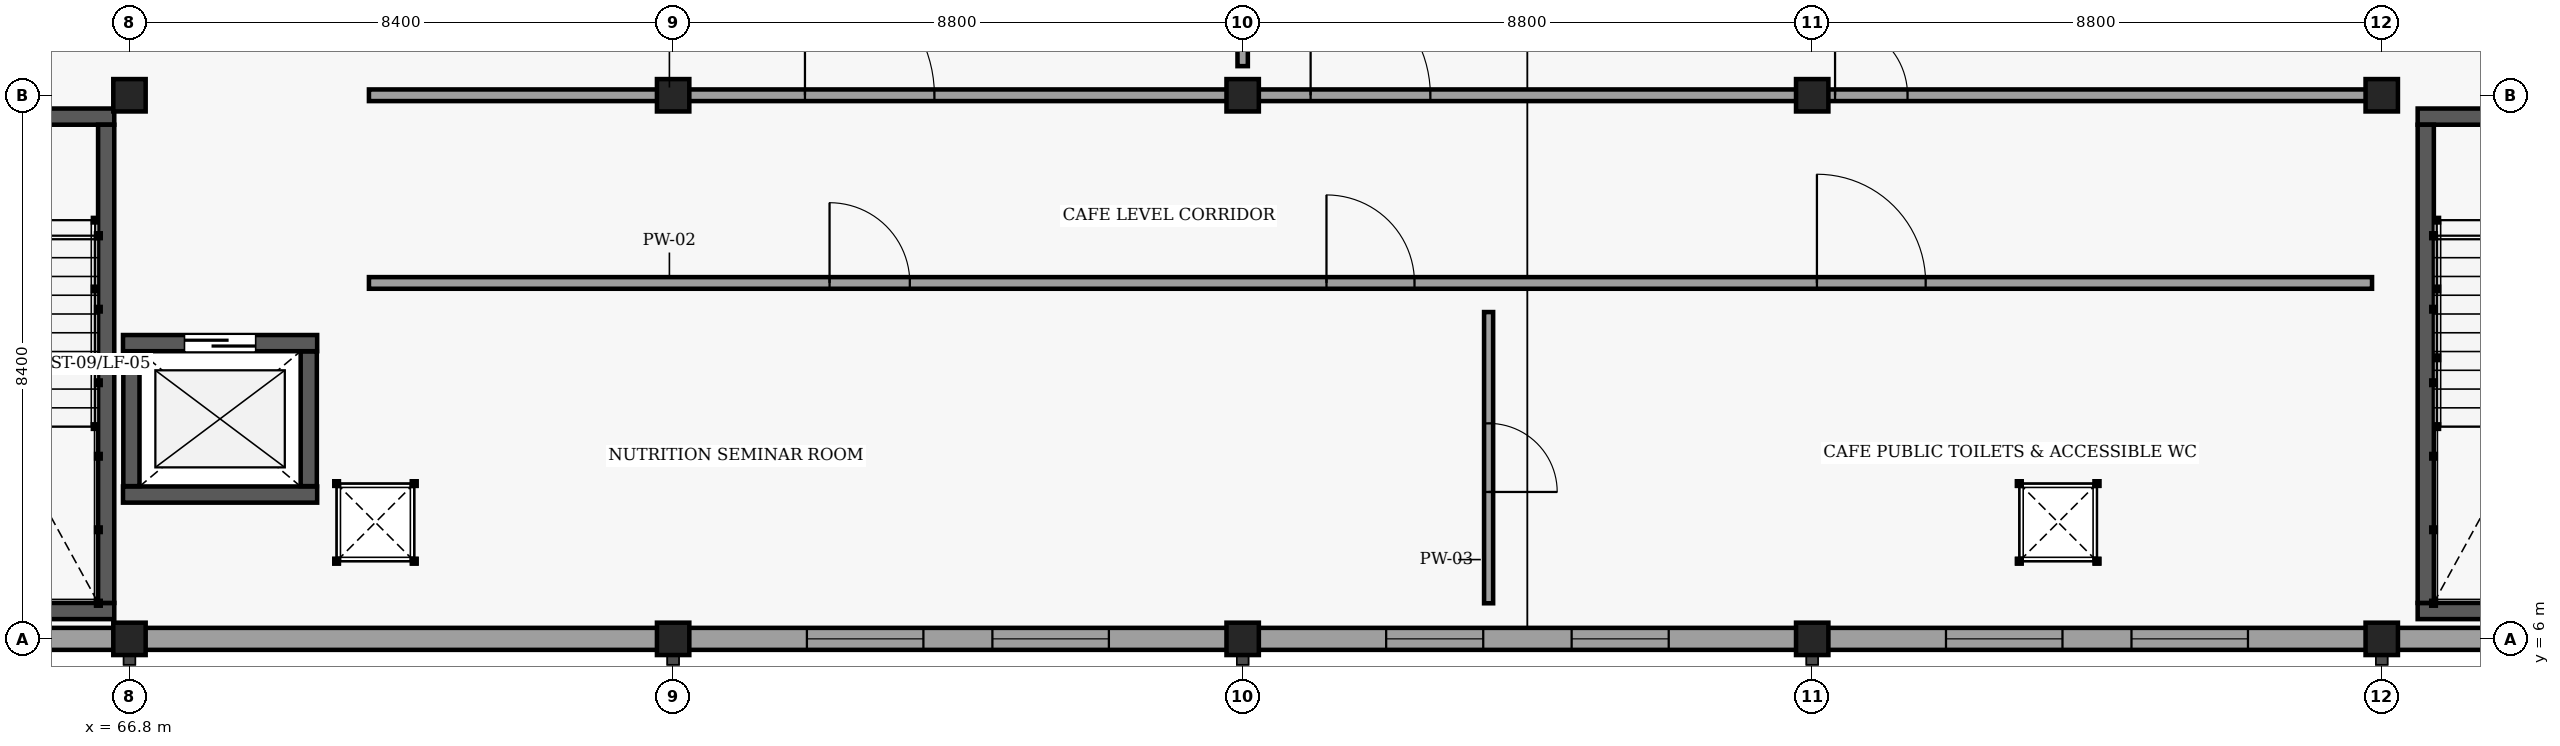
"""IFC4 building model, lengths in metres.
Left out: names, types, materials, properties, quantities, classifications, styles, units other than length and angle.
Written with IfcOpenShell. Run it as: python <this file> out.ifc"""

import sys

from ifc_helpers import new_model, si_unit, direction, frame, frame_2d, origin, origin_2d, place, context, subcontext, project, spatial, rectangle, extrude, element, fill, save


model = new_model("IFC4")
c1 = context("Model", 3, precision=1e-05, world=origin(), true_north=direction((0.0, 1.0)))
c2 = subcontext(c1, "Body", "Model", "MODEL_VIEW")
j1 = project(units=[si_unit("LENGTHUNIT", "METRE"), si_unit("PLANEANGLEUNIT", "RADIAN")], contexts=[c1])
p1 = place(None, origin())
s1 = spatial("IfcSite", under=j1, at=p1, CompositionType="ELEMENT")
p2 = place(p1, origin())
s2 = spatial("IfcBuilding", under=s1, at=p2, CompositionType="ELEMENT")
p3 = place(p2, frame((0.0, 0.0, 4.8)))
s3 = spatial("IfcBuildingStorey", under=s2, at=p3, CompositionType="ELEMENT", Elevation=4.8)
for number, where, z_axis, x_axis in (
    (1, (66.8, 6.0, 0.0), (0.0, 0.0, 1.0), (1.0, 0.0, 0.0)),
    (2, (66.8, 14.4, 0.0), (0.0, 0.0, 1.0), (1.0, 0.0, 0.0)),
    (3, (75.2, 6.0, 0.0), (0.0, 0.0, 1.0), (1.0, 0.0, 0.0)),
    (4, (75.2, 14.4, 0.0), (0.0, 0.0, 1.0), (1.0, 0.0, 0.0)),
    (5, (84.0, 6.0, 0.0), (0.0, 0.0, 1.0), (1.0, 0.0, 0.0)),
    (6, (84.0, 14.4, 0.0), (0.0, 0.0, 1.0), (1.0, 0.0, 0.0)),
    (7, (92.8, 6.0, 0.0), (0.0, 0.0, 1.0), (1.0, 0.0, 0.0)),
    (8, (92.8, 14.4, 0.0), (0.0, 0.0, 1.0), (1.0, 0.0, 0.0)),
    (9, (101.6, 6.0, 0.0), (0.0, 0.0, 1.0), (1.0, 0.0, 0.0)),
    (10, (101.6, 14.4, 0.0), (0.0, 0.0, 1.0), (1.0, 0.0, 0.0)),
):
    element("IfcColumn", number, at=place(p3, frame(where, z_axis=z_axis, x_axis=x_axis)), inside=s3, PredefinedType="COLUMN", context=c2, shape_type="SweptSolid", body=[
        extrude(rectangle(XDim=0.5, YDim=0.5, at=origin_2d()), origin(), (0.0, 0.0, 1.0), 4.2),
    ])
p4 = place(p3, frame((58.5, 6.0, 0.0), z_axis=(0.0, 0.0, 1.0), x_axis=(1.0, 0.0, 0.0)))
e11 = element("IfcWall", 11, at=p4, inside=s3, PredefinedType="SOLIDWALL", context=c2, shape_type="SweptSolid", body=[
    extrude(rectangle(XDim=8.2, YDim=0.34, at=frame_2d((4.1, 0.0))), origin(), (0.0, 0.0, 1.0), 3.465),
])
p5 = place(p3, frame((66.9, 6.0, 0.0), z_axis=(0.0, 0.0, 1.0), x_axis=(1.0, 0.0, 0.0)))
e12 = element("IfcWall", 12, at=p5, inside=s3, PredefinedType="SOLIDWALL", context=c2, shape_type="SweptSolid", body=[
    extrude(rectangle(XDim=8.2, YDim=0.34, at=frame_2d((4.1, 0.0))), origin(), (0.0, 0.0, 1.0), 3.465),
])
p6 = place(p3, frame((75.3, 6.0, 0.0), z_axis=(0.0, 0.0, 1.0), x_axis=(1.0, 0.0, 0.0)))
e13 = element("IfcWall", 13, at=p6, inside=s3, PredefinedType="SOLIDWALL", context=c2, shape_type="SweptSolid", body=[
    extrude(rectangle(XDim=8.6, YDim=0.34, at=frame_2d((4.3, 0.0))), origin(), (0.0, 0.0, 1.0), 3.465),
])
p7 = place(p6, frame((1.967, 0.0, 1.1)))
e14 = element("IfcOpeningElement", 14, at=p7, cuts=e13, PredefinedType="OPENING", context=c2, shape_type="SweptSolid", body=[
    extrude(rectangle(XDim=1.8, YDim=1.5, at=frame_2d((0.9, 0.75))), frame((0.0, 0.18, 0.0), z_axis=(0.0, -1.0, 0.0), x_axis=(1.0, 0.0, 0.0)), (0.0, 0.0, 1.0), 0.36),
])
p8 = place(p6, frame((4.833, 0.0, 1.1)))
e15 = element("IfcOpeningElement", 15, at=p8, cuts=e13, PredefinedType="OPENING", context=c2, shape_type="SweptSolid", body=[
    extrude(rectangle(XDim=1.8, YDim=1.5, at=frame_2d((0.9, 0.75))), frame((0.0, 0.18, 0.0), z_axis=(0.0, -1.0, 0.0), x_axis=(1.0, 0.0, 0.0)), (0.0, 0.0, 1.0), 0.36),
])
p9 = place(p3, frame((84.1, 6.0, 0.0), z_axis=(0.0, 0.0, 1.0), x_axis=(1.0, 0.0, 0.0)))
e16 = element("IfcWall", 16, at=p9, inside=s3, PredefinedType="SOLIDWALL", context=c2, shape_type="SweptSolid", body=[
    extrude(rectangle(XDim=8.6, YDim=0.34, at=frame_2d((4.3, 0.0))), origin(), (0.0, 0.0, 1.0), 3.465),
])
p10 = place(p9, frame((2.117, 0.0, 1.1)))
e17 = element("IfcOpeningElement", 17, at=p10, cuts=e16, PredefinedType="OPENING", context=c2, shape_type="SweptSolid", body=[
    extrude(rectangle(XDim=1.5, YDim=1.8, at=frame_2d((0.75, 0.9))), frame((0.0, 0.18, 0.0), z_axis=(0.0, -1.0, 0.0), x_axis=(1.0, 0.0, 0.0)), (0.0, 0.0, 1.0), 0.36),
])
p11 = place(p9, frame((4.983, 0.0, 1.1)))
e18 = element("IfcOpeningElement", 18, at=p11, cuts=e16, PredefinedType="OPENING", context=c2, shape_type="SweptSolid", body=[
    extrude(rectangle(XDim=1.5, YDim=1.8, at=frame_2d((0.75, 0.9))), frame((0.0, 0.18, 0.0), z_axis=(0.0, -1.0, 0.0), x_axis=(1.0, 0.0, 0.0)), (0.0, 0.0, 1.0), 0.36),
])
p12 = place(p3, frame((92.9, 6.0, 0.0), z_axis=(0.0, 0.0, 1.0), x_axis=(1.0, 0.0, 0.0)))
e19 = element("IfcWall", 19, at=p12, inside=s3, PredefinedType="SOLIDWALL", context=c2, shape_type="SweptSolid", body=[
    extrude(rectangle(XDim=8.6, YDim=0.34, at=frame_2d((4.3, 0.0))), origin(), (0.0, 0.0, 1.0), 3.465),
])
p13 = place(p12, frame((1.967, 0.0, 1.1)))
e20 = element("IfcOpeningElement", 20, at=p13, cuts=e19, PredefinedType="OPENING", context=c2, shape_type="SweptSolid", body=[
    extrude(rectangle(XDim=1.8, YDim=1.8, at=frame_2d((0.9, 0.9))), frame((0.0, 0.18, 0.0), z_axis=(0.0, -1.0, 0.0), x_axis=(1.0, 0.0, 0.0)), (0.0, 0.0, 1.0), 0.36),
])
p14 = place(p12, frame((4.833, 0.0, 1.1)))
e21 = element("IfcOpeningElement", 21, at=p14, cuts=e19, PredefinedType="OPENING", context=c2, shape_type="SweptSolid", body=[
    extrude(rectangle(XDim=1.8, YDim=1.8, at=frame_2d((0.9, 0.9))), frame((0.0, 0.18, 0.0), z_axis=(0.0, -1.0, 0.0), x_axis=(1.0, 0.0, 0.0)), (0.0, 0.0, 1.0), 0.36),
])
p15 = place(p3, frame((101.7, 6.0, 0.0), z_axis=(0.0, 0.0, 1.0), x_axis=(1.0, 0.0, 0.0)))
e22 = element("IfcWall", 22, at=p15, inside=s3, PredefinedType="SOLIDWALL", context=c2, shape_type="SweptSolid", body=[
    extrude(rectangle(XDim=8.6, YDim=0.34, at=frame_2d((4.3, 0.0))), origin(), (0.0, 0.0, 1.0), 3.465),
])
p16 = place(p3, frame((62.955, 14.07, 0.0), z_axis=(0.0, 0.0, 1.0), x_axis=(1.0, 0.0, 0.0)))
e23 = element("IfcWall", 23, at=p16, inside=s3, PredefinedType="SHEAR", context=c2, shape_type="SweptSolid", body=[
    extrude(rectangle(XDim=3.61, YDim=0.25, at=frame_2d((1.805, 0.0))), origin(), (0.0, 0.0, 1.0), 3.96),
])
p17 = place(p16, frame((1.205, 0.0, 0.0)))
e24 = element("IfcOpeningElement", 24, at=p17, cuts=e23, PredefinedType="OPENING", context=c2, shape_type="SweptSolid", body=[
    extrude(rectangle(XDim=1.2, YDim=2.15, at=frame_2d((0.6, 1.075))), frame((0.0, 0.135, 0.0), z_axis=(0.0, -1.0, 0.0), x_axis=(1.0, 0.0, 0.0)), (0.0, 0.0, 1.0), 0.27),
])
p18 = place(p3, frame((66.565, 6.43, 0.0), z_axis=(0.0, 0.0, 1.0), x_axis=(-1.0, 0.0, 0.0)))
e25 = element("IfcWall", 25, at=p18, inside=s3, PredefinedType="SHEAR", context=c2, shape_type="SweptSolid", body=[
    extrude(rectangle(XDim=3.61, YDim=0.25, at=frame_2d((1.805, 0.0))), origin(), (0.0, 0.0, 1.0), 3.96),
])
p19 = place(p3, frame((66.44, 13.945, 0.0), z_axis=(0.0, 0.0, 1.0), x_axis=(0.0, -1.0, 0.0)))
e26 = element("IfcWall", 26, at=p19, inside=s3, PredefinedType="SHEAR", context=c2, shape_type="SweptSolid", body=[
    extrude(rectangle(XDim=7.39, YDim=0.25, at=frame_2d((3.695, 0.0))), origin(), (0.0, 0.0, 1.0), 3.96),
])
p20 = place(p3, frame((66.7, 8.23, 0.0), z_axis=(0.0, 0.0, 1.0), x_axis=(1.0, 0.0, 0.0)))
e27 = element("IfcWall", 27, at=p20, inside=s3, PredefinedType="SHEAR", context=c2, shape_type="SweptSolid", body=[
    extrude(rectangle(XDim=3.0, YDim=0.25, at=frame_2d((1.5, 0.0))), origin(), (0.0, 0.0, 1.0), 3.96),
])
p21 = place(p3, frame((69.7, 10.57, 0.0), z_axis=(0.0, 0.0, 1.0), x_axis=(-1.0, 0.0, 0.0)))
e28 = element("IfcWall", 28, at=p21, inside=s3, PredefinedType="SHEAR", context=c2, shape_type="SweptSolid", body=[
    extrude(rectangle(XDim=3.0, YDim=0.25, at=frame_2d((1.5, 0.0))), origin(), (0.0, 0.0, 1.0), 3.96),
])
p22 = place(p21, frame((0.95, 0.0, 0.0)))
e29 = element("IfcOpeningElement", 29, at=p22, cuts=e28, PredefinedType="OPENING", context=c2, shape_type="SweptSolid", body=[
    extrude(rectangle(XDim=1.1, YDim=2.15, at=frame_2d((0.55, 1.075))), frame((0.0, 0.135, 0.0), z_axis=(0.0, -1.0, 0.0), x_axis=(1.0, 0.0, 0.0)), (0.0, 0.0, 1.0), 0.27),
])
for number, where, z_axis, x_axis in (
    (30, (69.57, 8.36, 0.0), (0.0, 0.0, 1.0), (0.0, 1.0, 0.0)),
    (31, (66.83, 10.44, 0.0), (0.0, 0.0, 1.0), (0.0, -1.0, 0.0)),
):
    element("IfcWall", number, at=place(p3, frame(where, z_axis=z_axis, x_axis=x_axis)), inside=s3, PredefinedType="SHEAR", context=c2, shape_type="SweptSolid", body=[
        extrude(rectangle(XDim=2.08, YDim=0.25, at=frame_2d((1.04, 0.0))), origin(), (0.0, 0.0, 1.0), 3.96),
    ])
p23 = place(p3, frame((102.155, 14.07, 0.0), z_axis=(0.0, 0.0, 1.0), x_axis=(1.0, 0.0, 0.0)))
e32 = element("IfcWall", 32, at=p23, inside=s3, PredefinedType="SHEAR", context=c2, shape_type="SweptSolid", body=[
    extrude(rectangle(XDim=3.61, YDim=0.25, at=frame_2d((1.805, 0.0))), origin(), (0.0, 0.0, 1.0), 3.96),
])
p24 = place(p23, frame((1.235, 0.0, 0.0)))
e33 = element("IfcOpeningElement", 33, at=p24, cuts=e32, PredefinedType="OPENING", context=c2, shape_type="SweptSolid", body=[
    extrude(rectangle(XDim=1.14, YDim=2.15, at=frame_2d((0.57, 1.075))), frame((0.0, 0.135, 0.0), z_axis=(0.0, -1.0, 0.0), x_axis=(1.0, 0.0, 0.0)), (0.0, 0.0, 1.0), 0.27),
])
p25 = place(p3, frame((105.765, 6.43, 0.0), z_axis=(0.0, 0.0, 1.0), x_axis=(-1.0, 0.0, 0.0)))
e34 = element("IfcWall", 34, at=p25, inside=s3, PredefinedType="SHEAR", context=c2, shape_type="SweptSolid", body=[
    extrude(rectangle(XDim=3.61, YDim=0.25, at=frame_2d((1.805, 0.0))), origin(), (0.0, 0.0, 1.0), 3.96),
])
p26 = place(p3, frame((102.28, 6.555, 0.0), z_axis=(0.0, 0.0, 1.0), x_axis=(0.0, 1.0, 0.0)))
e35 = element("IfcWall", 35, at=p26, inside=s3, PredefinedType="SHEAR", context=c2, shape_type="SweptSolid", body=[
    extrude(rectangle(XDim=7.39, YDim=0.25, at=frame_2d((3.695, 0.0))), origin(), (0.0, 0.0, 1.0), 3.96),
])
p27 = place(p3, frame((70.5, 11.5, 0.0), z_axis=(0.0, 0.0, 1.0), x_axis=(1.0, 0.0, 0.0)))
e36 = element("IfcWall", 36, at=p27, inside=s3, PredefinedType="PARTITIONING", context=c2, shape_type="SweptSolid", body=[
    extrude(rectangle(XDim=30.95, YDim=0.18, at=frame_2d((15.475, 0.0))), origin(), (0.0, 0.0, 1.0), 3.295),
])
p28 = place(p27, frame((7.117, 0.0, 0.0)))
e37 = element("IfcOpeningElement", 37, at=p28, cuts=e36, PredefinedType="OPENING", context=c2, shape_type="SweptSolid", body=[
    extrude(rectangle(XDim=1.24, YDim=2.2, at=frame_2d((0.62, 1.1))), frame((0.0, 0.1, 0.0), z_axis=(0.0, -1.0, 0.0), x_axis=(1.0, 0.0, 0.0)), (0.0, 0.0, 1.0), 0.2),
])
p29 = place(p27, frame((14.795, 0.0, 0.0)))
e38 = element("IfcOpeningElement", 38, at=p29, cuts=e36, PredefinedType="OPENING", context=c2, shape_type="SweptSolid", body=[
    extrude(rectangle(XDim=1.36, YDim=2.22, at=frame_2d((0.68, 1.11))), frame((0.0, 0.1, 0.0), z_axis=(0.0, -1.0, 0.0), x_axis=(1.0, 0.0, 0.0)), (0.0, 0.0, 1.0), 0.2),
])
p30 = place(p27, frame((22.373, 0.0, 0.0)))
e39 = element("IfcOpeningElement", 39, at=p30, cuts=e36, PredefinedType="OPENING", context=c2, shape_type="SweptSolid", body=[
    extrude(rectangle(XDim=1.68, YDim=2.26, at=frame_2d((0.84, 1.13))), frame((0.0, 0.1, 0.0), z_axis=(0.0, -1.0, 0.0), x_axis=(1.0, 0.0, 0.0)), (0.0, 0.0, 1.0), 0.2),
])
p31 = place(p3, frame((70.5, 14.4, 0.0), z_axis=(0.0, 0.0, 1.0), x_axis=(1.0, 0.0, 0.0)))
e40 = element("IfcWall", 40, at=p31, inside=s3, PredefinedType="PARTITIONING", context=c2, shape_type="SweptSolid", body=[
    extrude(rectangle(XDim=30.95, YDim=0.18, at=frame_2d((15.475, 0.0))), origin(), (0.0, 0.0, 1.0), 3.245),
])
p32 = place(p31, frame((6.737, 0.0, 0.0)))
e41 = element("IfcOpeningElement", 41, at=p32, cuts=e40, PredefinedType="OPENING", context=c2, shape_type="SweptSolid", body=[
    extrude(rectangle(XDim=2.0, YDim=2.3, at=frame_2d((1.0, 1.15))), frame((0.0, 0.1, 0.0), z_axis=(0.0, -1.0, 0.0), x_axis=(1.0, 0.0, 0.0)), (0.0, 0.0, 1.0), 0.2),
])
p33 = place(p31, frame((14.55, 0.0, 0.0)))
e42 = element("IfcOpeningElement", 42, at=p33, cuts=e40, PredefinedType="OPENING", context=c2, shape_type="SweptSolid", body=[
    extrude(rectangle(XDim=1.85, YDim=2.22, at=frame_2d((0.925, 1.11))), frame((0.0, 0.1, 0.0), z_axis=(0.0, -1.0, 0.0), x_axis=(1.0, 0.0, 0.0)), (0.0, 0.0, 1.0), 0.2),
])
p34 = place(p31, frame((22.653, 0.0, 0.0)))
e43 = element("IfcOpeningElement", 43, at=p34, cuts=e40, PredefinedType="OPENING", context=c2, shape_type="SweptSolid", body=[
    extrude(rectangle(XDim=1.12, YDim=2.16, at=frame_2d((0.56, 1.08))), frame((0.0, 0.1, 0.0), z_axis=(0.0, -1.0, 0.0), x_axis=(1.0, 0.0, 0.0)), (0.0, 0.0, 1.0), 0.2),
])
p35 = place(p3, frame((87.8, 6.55, 0.0), z_axis=(0.0, 0.0, 1.0), x_axis=(0.0, 1.0, 0.0)))
e44 = element("IfcWall", 44, at=p35, inside=s3, PredefinedType="PARTITIONING", context=c2, shape_type="SweptSolid", body=[
    extrude(rectangle(XDim=4.5, YDim=0.14, at=frame_2d((2.25, 0.0))), origin(), (0.0, 0.0, 1.0), 3.945),
])
p36 = place(p35, frame((1.72, 0.0, 0.0)))
e45 = element("IfcOpeningElement", 45, at=p36, cuts=e44, PredefinedType="OPENING", context=c2, shape_type="SweptSolid", body=[
    extrude(rectangle(XDim=1.06, YDim=2.16, at=frame_2d((0.53, 1.08))), frame((0.0, 0.08, 0.0), z_axis=(0.0, -1.0, 0.0), x_axis=(1.0, 0.0, 0.0)), (0.0, 0.0, 1.0), 0.16),
])
p37 = place(p3, frame((84.0, 14.85, 0.0), z_axis=(0.0, 0.0, 1.0), x_axis=(0.0, 1.0, 0.0)))
e46 = element("IfcWall", 46, at=p37, inside=s3, PredefinedType="PARTITIONING", context=c2, shape_type="SweptSolid", body=[
    extrude(rectangle(XDim=7.2, YDim=0.16, at=frame_2d((3.6, 0.0))), origin(), (0.0, 0.0, 1.0), 3.295),
])
p38 = place(p37, frame((3.1, 0.0, 0.0)))
e47 = element("IfcOpeningElement", 47, at=p38, cuts=e46, PredefinedType="OPENING", context=c2, shape_type="SweptSolid", body=[
    extrude(rectangle(XDim=1.0, YDim=2.14, at=frame_2d((0.5, 1.07))), frame((0.0, 0.09, 0.0), z_axis=(0.0, -1.0, 0.0), x_axis=(1.0, 0.0, 0.0)), (0.0, 0.0, 1.0), 0.18),
])
p39 = place(p7, origin())
e48 = element("IfcWindow", 48, at=p39, inside=s3, PartitioningType="SINGLE_PANEL", PredefinedType="WINDOW", context=c2, shape_type="SweptSolid", body=[
    extrude(rectangle(XDim=1.8, YDim=1.5, at=frame_2d((0.9, 0.75))), frame((0.0, 0.03, 0.0), z_axis=(0.0, -1.0, 0.0), x_axis=(1.0, 0.0, 0.0)), (0.0, 0.0, 1.0), 0.06),
])
fill(e14, e48)
p40 = place(p8, origin())
e49 = element("IfcWindow", 49, at=p40, inside=s3, PartitioningType="SINGLE_PANEL", PredefinedType="WINDOW", context=c2, shape_type="SweptSolid", body=[
    extrude(rectangle(XDim=1.8, YDim=1.5, at=frame_2d((0.9, 0.75))), frame((0.0, 0.03, 0.0), z_axis=(0.0, -1.0, 0.0), x_axis=(1.0, 0.0, 0.0)), (0.0, 0.0, 1.0), 0.06),
])
fill(e15, e49)
p41 = place(p10, origin())
e50 = element("IfcWindow", 50, at=p41, inside=s3, PartitioningType="SINGLE_PANEL", PredefinedType="WINDOW", context=c2, shape_type="SweptSolid", body=[
    extrude(rectangle(XDim=1.5, YDim=1.8, at=frame_2d((0.75, 0.9))), frame((0.0, 0.03, 0.0), z_axis=(0.0, -1.0, 0.0), x_axis=(1.0, 0.0, 0.0)), (0.0, 0.0, 1.0), 0.06),
])
fill(e17, e50)
p42 = place(p11, origin())
e51 = element("IfcWindow", 51, at=p42, inside=s3, PartitioningType="SINGLE_PANEL", PredefinedType="WINDOW", context=c2, shape_type="SweptSolid", body=[
    extrude(rectangle(XDim=1.5, YDim=1.8, at=frame_2d((0.75, 0.9))), frame((0.0, 0.03, 0.0), z_axis=(0.0, -1.0, 0.0), x_axis=(1.0, 0.0, 0.0)), (0.0, 0.0, 1.0), 0.06),
])
fill(e18, e51)
p43 = place(p13, origin())
e52 = element("IfcWindow", 52, at=p43, inside=s3, PartitioningType="SINGLE_PANEL", PredefinedType="WINDOW", context=c2, shape_type="SweptSolid", body=[
    extrude(rectangle(XDim=1.8, YDim=1.8, at=frame_2d((0.9, 0.9))), frame((0.0, 0.03, 0.0), z_axis=(0.0, -1.0, 0.0), x_axis=(1.0, 0.0, 0.0)), (0.0, 0.0, 1.0), 0.06),
])
fill(e20, e52)
p44 = place(p14, origin())
e53 = element("IfcWindow", 53, at=p44, inside=s3, PartitioningType="SINGLE_PANEL", PredefinedType="WINDOW", context=c2, shape_type="SweptSolid", body=[
    extrude(rectangle(XDim=1.8, YDim=1.8, at=frame_2d((0.9, 0.9))), frame((0.0, 0.03, 0.0), z_axis=(0.0, -1.0, 0.0), x_axis=(1.0, 0.0, 0.0)), (0.0, 0.0, 1.0), 0.06),
])
fill(e21, e53)
p45 = place(p22, origin())
e54 = element("IfcDoor", 54, at=p45, inside=s3, OperationType="SLIDING_TO_LEFT", PredefinedType="DOOR", context=c2, shape_type="SweptSolid", body=[
    extrude(rectangle(XDim=1.1, YDim=2.15, at=frame_2d((0.55, 1.075))), frame((0.0, 0.025, 0.0), z_axis=(0.0, -1.0, 0.0), x_axis=(1.0, 0.0, 0.0)), (0.0, 0.0, 1.0), 0.05),
])
fill(e29, e54)
p46 = place(p28, origin())
e55 = element("IfcDoor", 55, at=p46, inside=s3, OperationType="SINGLE_SWING_LEFT", PredefinedType="DOOR", context=c2, shape_type="SweptSolid", body=[
    extrude(rectangle(XDim=1.24, YDim=2.2, at=frame_2d((0.62, 1.1))), frame((0.0, 0.025, 0.0), z_axis=(0.0, -1.0, 0.0), x_axis=(1.0, 0.0, 0.0)), (0.0, 0.0, 1.0), 0.05),
])
fill(e37, e55)
p47 = place(p29, origin())
e56 = element("IfcDoor", 56, at=p47, inside=s3, OperationType="DOUBLE_DOOR_SINGLE_SWING", PredefinedType="DOOR", context=c2, shape_type="SweptSolid", body=[
    extrude(rectangle(XDim=1.36, YDim=2.22, at=frame_2d((0.68, 1.11))), frame((0.0, 0.025, 0.0), z_axis=(0.0, -1.0, 0.0), x_axis=(1.0, 0.0, 0.0)), (0.0, 0.0, 1.0), 0.05),
])
fill(e38, e56)
p48 = place(p30, origin())
e57 = element("IfcDoor", 57, at=p48, inside=s3, OperationType="DOUBLE_DOOR_SINGLE_SWING", PredefinedType="DOOR", context=c2, shape_type="SweptSolid", body=[
    extrude(rectangle(XDim=1.68, YDim=2.26, at=frame_2d((0.84, 1.13))), frame((0.0, 0.025, 0.0), z_axis=(0.0, -1.0, 0.0), x_axis=(1.0, 0.0, 0.0)), (0.0, 0.0, 1.0), 0.05),
])
fill(e39, e57)
p49 = place(p32, origin())
e58 = element("IfcDoor", 58, at=p49, inside=s3, OperationType="DOUBLE_DOOR_SINGLE_SWING", PredefinedType="DOOR", context=c2, shape_type="SweptSolid", body=[
    extrude(rectangle(XDim=2.0, YDim=2.3, at=frame_2d((1.0, 1.15))), frame((0.0, 0.025, 0.0), z_axis=(0.0, -1.0, 0.0), x_axis=(1.0, 0.0, 0.0)), (0.0, 0.0, 1.0), 0.05),
])
fill(e41, e58)
p50 = place(p33, origin())
e59 = element("IfcDoor", 59, at=p50, inside=s3, OperationType="DOUBLE_DOOR_SINGLE_SWING", PredefinedType="DOOR", context=c2, shape_type="SweptSolid", body=[
    extrude(rectangle(XDim=1.85, YDim=2.22, at=frame_2d((0.925, 1.11))), frame((0.0, 0.025, 0.0), z_axis=(0.0, -1.0, 0.0), x_axis=(1.0, 0.0, 0.0)), (0.0, 0.0, 1.0), 0.05),
])
fill(e42, e59)
p51 = place(p34, origin())
e60 = element("IfcDoor", 60, at=p51, inside=s3, OperationType="SINGLE_SWING_LEFT", PredefinedType="DOOR", context=c2, shape_type="SweptSolid", body=[
    extrude(rectangle(XDim=1.12, YDim=2.16, at=frame_2d((0.56, 1.08))), frame((0.0, 0.025, 0.0), z_axis=(0.0, -1.0, 0.0), x_axis=(1.0, 0.0, 0.0)), (0.0, 0.0, 1.0), 0.05),
])
fill(e43, e60)
p52 = place(p36, origin())
e61 = element("IfcDoor", 61, at=p52, inside=s3, OperationType="SINGLE_SWING_RIGHT", PredefinedType="DOOR", context=c2, shape_type="SweptSolid", body=[
    extrude(rectangle(XDim=1.06, YDim=2.16, at=frame_2d((0.53, 1.08))), frame((0.0, 0.025, 0.0), z_axis=(0.0, -1.0, 0.0), x_axis=(1.0, 0.0, 0.0)), (0.0, 0.0, 1.0), 0.05),
])
fill(e45, e61)
save(model, sys.argv[1])
